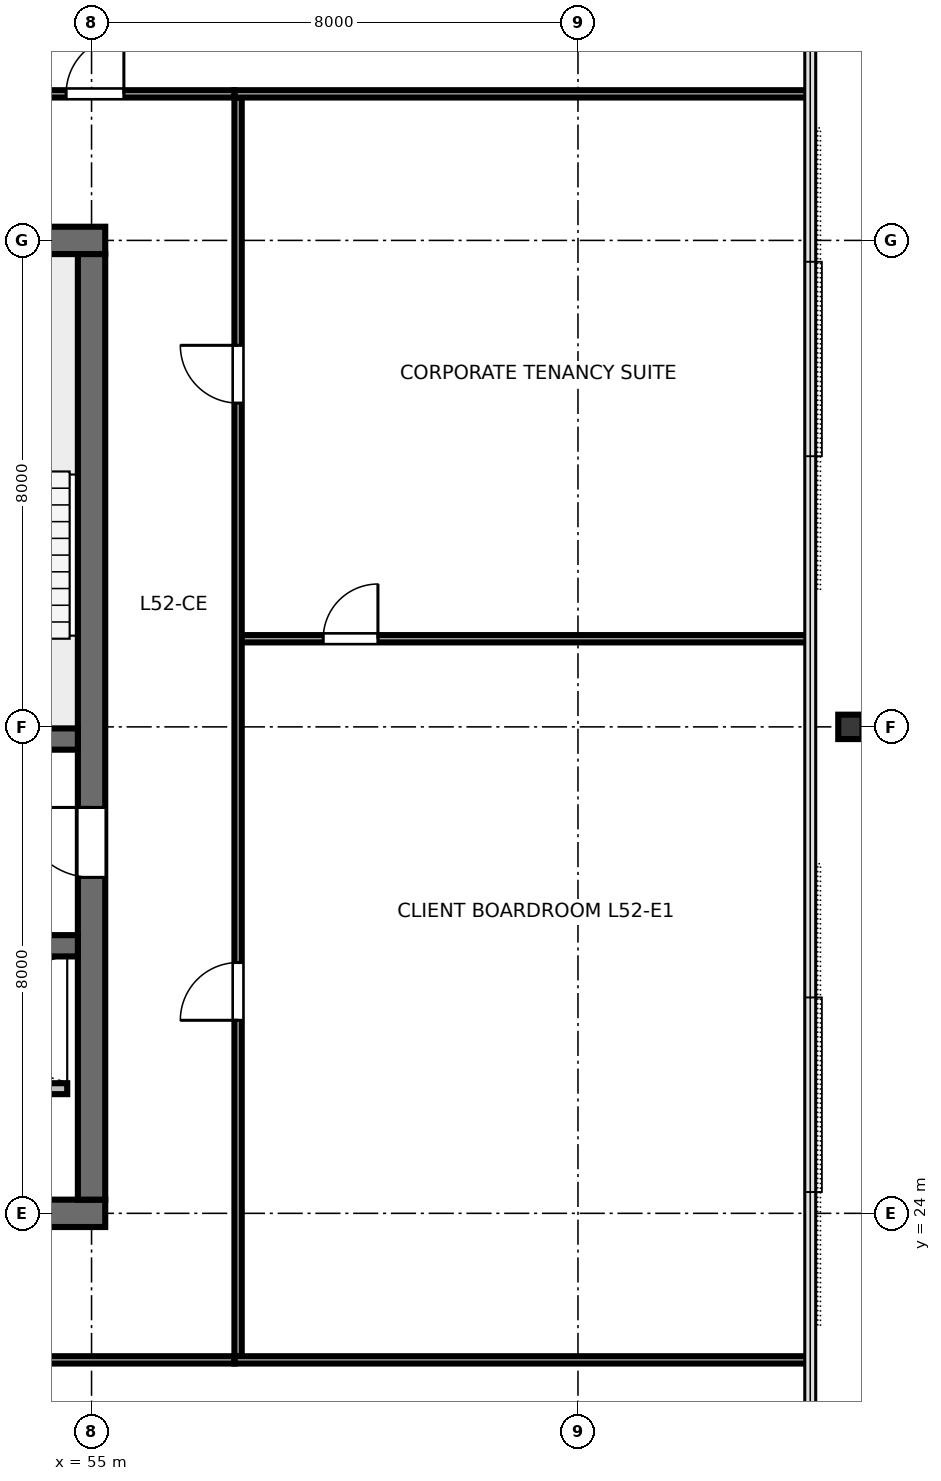
"""IFC4 building model, lengths in metres.
Left out: names, types, materials, properties, quantities, classifications, styles, units other than length and angle.
Written with IfcOpenShell. Run it as: python <this file> out.ifc"""

import sys

from ifc_helpers import new_model, si_unit, direction, frame, frame_2d, origin, origin_2d, place, context, subcontext, project, spatial, rectangle, i_section, extrude, element, fill, save


model = new_model("IFC4")
c1 = context("Model", 3, precision=1e-05, world=origin(), true_north=direction((0.0, 1.0)))
c2 = subcontext(c1, "Body", "Model", "MODEL_VIEW")
j1 = project(units=[si_unit("LENGTHUNIT", "METRE"), si_unit("PLANEANGLEUNIT", "RADIAN")], contexts=[c1])
p1 = place(None, origin())
s1 = spatial("IfcSite", under=j1, at=p1, CompositionType="ELEMENT")
p2 = place(p1, origin())
s2 = spatial("IfcBuilding", under=s1, at=p2, CompositionType="ELEMENT")
p3 = place(p2, frame((0.0, 0.0, 198.6)))
s3 = spatial("IfcBuildingStorey", under=s2, at=p3, CompositionType="ELEMENT", Elevation=198.6)
p4 = place(p3, frame((36.775, 24.0, 0.0), z_axis=(0.0, 0.0, 1.0), x_axis=(1.0, 0.0, 0.0)))
e1 = element("IfcWall", 1, at=p4, inside=s3, PredefinedType="SHEAR", context=c2, shape_type="SweptSolid", body=[
    extrude(rectangle(XDim=18.45, YDim=0.45, at=frame_2d((9.225, 0.0))), origin(), (0.0, 0.0, 1.0), 3.36),
])
p5 = place(p4, frame((13.425, 0.0, 0.0)))
e2 = element("IfcOpeningElement", 2, at=p5, cuts=e1, PredefinedType="OPENING", context=c2, shape_type="SweptSolid", body=[
    extrude(rectangle(XDim=1.6, YDim=2.15, at=frame_2d((0.8, 1.075))), frame((0.0, 0.235, 0.0), z_axis=(0.0, -1.0, 0.0), x_axis=(1.0, 0.0, 0.0)), (0.0, 0.0, 1.0), 0.47),
])
p6 = place(p3, frame((36.775, 40.0, 0.0), z_axis=(0.0, 0.0, 1.0), x_axis=(1.0, 0.0, 0.0)))
e3 = element("IfcWall", 3, at=p6, inside=s3, PredefinedType="SHEAR", context=c2, shape_type="SweptSolid", body=[
    extrude(rectangle(XDim=18.45, YDim=0.45, at=frame_2d((9.225, 0.0))), origin(), (0.0, 0.0, 1.0), 3.36),
])
p7 = place(p6, frame((10.525, 0.0, 0.0)))
e4 = element("IfcOpeningElement", 4, at=p7, cuts=e3, PredefinedType="OPENING", context=c2, shape_type="SweptSolid", body=[
    extrude(rectangle(XDim=1.0, YDim=2.15, at=frame_2d((0.5, 1.075))), frame((0.0, 0.235, 0.0), z_axis=(0.0, -1.0, 0.0), x_axis=(1.0, 0.0, 0.0)), (0.0, 0.0, 1.0), 0.47),
])
p8 = place(p3, frame((55.0, 24.225, 0.0), z_axis=(0.0, 0.0, 1.0), x_axis=(0.0, 1.0, 0.0)))
e5 = element("IfcWall", 5, at=p8, inside=s3, PredefinedType="SHEAR", context=c2, shape_type="SweptSolid", body=[
    extrude(rectangle(XDim=15.55, YDim=0.45, at=frame_2d((7.775, 0.0))), origin(), (0.0, 0.0, 1.0), 3.36),
])
p9 = place(p8, frame((5.3, 0.0, 0.0)))
e6 = element("IfcOpeningElement", 6, at=p9, cuts=e5, PredefinedType="OPENING", context=c2, shape_type="SweptSolid", body=[
    extrude(rectangle(XDim=1.15, YDim=2.15, at=frame_2d((0.575, 1.075))), frame((0.0, 0.235, 0.0), z_axis=(0.0, -1.0, 0.0), x_axis=(1.0, 0.0, 0.0)), (0.0, 0.0, 1.0), 0.47),
])
p10 = place(p3, frame((37.225, 31.8, 0.0), z_axis=(0.0, 0.0, 1.0), x_axis=(1.0, 0.0, 0.0)))
e7 = element("IfcWall", 7, at=p10, inside=s3, PredefinedType="SHEAR", context=c2, shape_type="SweptSolid", body=[
    extrude(rectangle(XDim=17.55, YDim=0.35, at=frame_2d((8.775, 0.0))), origin(), (0.0, 0.0, 1.0), 3.36),
])
p11 = place(p10, frame((0.825, 0.0, 0.0)))
e8 = element("IfcOpeningElement", 8, at=p11, cuts=e7, PredefinedType="OPENING", context=c2, shape_type="SweptSolid", body=[
    extrude(rectangle(XDim=1.1, YDim=2.15, at=frame_2d((0.55, 1.075))), frame((0.0, 0.185, 0.0), z_axis=(0.0, -1.0, 0.0), x_axis=(1.0, 0.0, 0.0)), (0.0, 0.0, 1.0), 0.37),
])
p12 = place(p10, frame((14.725, 0.0, 0.0)))
e9 = element("IfcOpeningElement", 9, at=p12, cuts=e7, PredefinedType="OPENING", context=c2, shape_type="SweptSolid", body=[
    extrude(rectangle(XDim=1.1, YDim=2.15, at=frame_2d((0.55, 1.075))), frame((0.0, 0.185, 0.0), z_axis=(0.0, -1.0, 0.0), x_axis=(1.0, 0.0, 0.0)), (0.0, 0.0, 1.0), 0.37),
])
p13 = place(p3, frame((37.225, 28.4, 0.0), z_axis=(0.0, 0.0, 1.0), x_axis=(1.0, 0.0, 0.0)))
e10 = element("IfcWall", 10, at=p13, inside=s3, PredefinedType="SHEAR", context=c2, shape_type="SweptSolid", body=[
    extrude(rectangle(XDim=17.55, YDim=0.35, at=frame_2d((8.775, 0.0))), origin(), (0.0, 0.0, 1.0), 3.36),
])
p14 = place(p3, frame((67.48, 32.0, 0.0), z_axis=(0.0, 0.0, 1.0), x_axis=(0.0, 1.0, 0.0)))
e11 = element("IfcColumn", 11, at=p14, inside=s3, PredefinedType="COLUMN", context=c2, shape_type="SweptSolid", body=[
    extrude(i_section(OverallWidth=0.401, OverallDepth=0.399, WebThickness=0.025, FlangeThickness=0.04, FilletRadius=0.025, at=origin_2d()), origin(), (0.0, 0.0, 1.0), 3.373),
])
p15 = place(p3, frame((47.6, 26.05, 0.0), z_axis=(0.0, 0.0, 1.0), x_axis=(1.0, 0.0, 0.0)))
e12 = element("IfcWall", 12, at=p15, inside=s3, PredefinedType="PARTITIONING", context=c2, shape_type="SweptSolid", body=[
    extrude(rectangle(XDim=7.0, YDim=0.18, at=frame_2d((3.5, 0.0))), origin(), (0.0, 0.0, 1.0), 3.375),
])
p16 = place(p15, frame((1.2, 0.0, 0.0)))
e13 = element("IfcOpeningElement", 13, at=p16, cuts=e12, PredefinedType="OPENING", context=c2, shape_type="SweptSolid", body=[
    extrude(rectangle(XDim=1.05, YDim=2.15, at=frame_2d((0.525, 1.075))), frame((0.0, 0.1, 0.0), z_axis=(0.0, -1.0, 0.0), x_axis=(1.0, 0.0, 0.0)), (0.0, 0.0, 1.0), 0.2),
])
p17 = place(p15, frame((3.4, 0.0, 0.0)))
e14 = element("IfcOpeningElement", 14, at=p17, cuts=e12, PredefinedType="OPENING", context=c2, shape_type="SweptSolid", body=[
    extrude(rectangle(XDim=1.05, YDim=2.15, at=frame_2d((0.525, 1.075))), frame((0.0, 0.1, 0.0), z_axis=(0.0, -1.0, 0.0), x_axis=(1.0, 0.0, 0.0)), (0.0, 0.0, 1.0), 0.2),
])
p18 = place(p3, frame((47.02, 21.59, 0.0), z_axis=(0.0, 0.0, 1.0), x_axis=(1.0, 0.0, 0.0)))
e15 = element("IfcWall", 15, at=p18, inside=s3, PredefinedType="PARTITIONING", context=c2, shape_type="SweptSolid", body=[
    extrude(rectangle(XDim=10.33, YDim=0.12, at=frame_2d((5.165, 0.0))), origin(), (0.0, 0.0, 1.0), 2.655),
])
p19 = place(p18, frame((5.59, 0.0, 0.0)))
e16 = element("IfcOpeningElement", 16, at=p19, cuts=e15, PredefinedType="OPENING", context=c2, shape_type="SweptSolid", body=[
    extrude(rectangle(XDim=0.95, YDim=2.15, at=frame_2d((0.475, 1.075))), frame((0.0, 0.07, 0.0), z_axis=(0.0, -1.0, 0.0), x_axis=(1.0, 0.0, 0.0)), (0.0, 0.0, 1.0), 0.14),
])
p20 = place(p3, frame((47.02, 42.41, 0.0), z_axis=(0.0, 0.0, 1.0), x_axis=(1.0, 0.0, 0.0)))
e17 = element("IfcWall", 17, at=p20, inside=s3, PredefinedType="PARTITIONING", context=c2, shape_type="SweptSolid", body=[
    extrude(rectangle(XDim=10.33, YDim=0.12, at=frame_2d((5.165, 0.0))), origin(), (0.0, 0.0, 1.0), 2.655),
])
p21 = place(p20, frame((2.467, 0.0, 0.0)))
e18 = element("IfcOpeningElement", 18, at=p21, cuts=e17, PredefinedType="OPENING", context=c2, shape_type="SweptSolid", body=[
    extrude(rectangle(XDim=0.95, YDim=2.15, at=frame_2d((0.475, 1.075))), frame((0.0, 0.07, 0.0), z_axis=(0.0, -1.0, 0.0), x_axis=(1.0, 0.0, 0.0)), (0.0, 0.0, 1.0), 0.14),
])
p22 = place(p20, frame((7.562, 0.0, 0.0)))
e19 = element("IfcOpeningElement", 19, at=p22, cuts=e17, PredefinedType="OPENING", context=c2, shape_type="SweptSolid", body=[
    extrude(rectangle(XDim=0.95, YDim=2.15, at=frame_2d((0.475, 1.075))), frame((0.0, 0.07, 0.0), z_axis=(0.0, -1.0, 0.0), x_axis=(1.0, 0.0, 0.0)), (0.0, 0.0, 1.0), 0.14),
])
p23 = place(p3, frame((57.41, 33.449, 0.0), z_axis=(0.0, 0.0, 1.0), x_axis=(1.0, 0.0, 0.0)))
e20 = element("IfcWall", 20, at=p23, inside=s3, PredefinedType="PARTITIONING", context=c2, shape_type="SweptSolid", body=[
    extrude(rectangle(XDim=9.41, YDim=0.12, at=frame_2d((4.705, 0.0))), origin(), (0.0, 0.0, 1.0), 2.655),
])
p24 = place(p23, frame((1.4, 0.0, 0.0)))
e21 = element("IfcOpeningElement", 21, at=p24, cuts=e20, PredefinedType="OPENING", context=c2, shape_type="SweptSolid", body=[
    extrude(rectangle(XDim=0.9, YDim=2.15, at=frame_2d((0.45, 1.075))), frame((0.0, 0.07, 0.0), z_axis=(0.0, -1.0, 0.0), x_axis=(1.0, 0.0, 0.0)), (0.0, 0.0, 1.0), 0.14),
])
p25 = place(p3, frame((57.41, 21.65, 0.0), z_axis=(0.0, 0.0, 1.0), x_axis=(0.0, 1.0, 0.0)))
e22 = element("IfcWall", 22, at=p25, inside=s3, PredefinedType="PARTITIONING", context=c2, shape_type="SweptSolid", body=[
    extrude(rectangle(XDim=20.7, YDim=0.12, at=frame_2d((10.35, 0.0))), origin(), (0.0, 0.0, 1.0), 2.655),
])
p26 = place(p25, frame((5.525, 0.0, 0.0)))
e23 = element("IfcOpeningElement", 23, at=p26, cuts=e22, PredefinedType="OPENING", context=c2, shape_type="SweptSolid", body=[
    extrude(rectangle(XDim=0.95, YDim=2.15, at=frame_2d((0.475, 1.075))), frame((0.0, 0.07, 0.0), z_axis=(0.0, -1.0, 0.0), x_axis=(1.0, 0.0, 0.0)), (0.0, 0.0, 1.0), 0.14),
])
p27 = place(p25, frame((15.675, 0.0, 0.0)))
e24 = element("IfcOpeningElement", 24, at=p27, cuts=e22, PredefinedType="OPENING", context=c2, shape_type="SweptSolid", body=[
    extrude(rectangle(XDim=0.95, YDim=2.15, at=frame_2d((0.475, 1.075))), frame((0.0, 0.07, 0.0), z_axis=(0.0, -1.0, 0.0), x_axis=(1.0, 0.0, 0.0)), (0.0, 0.0, 1.0), 0.14),
])
for number, where, z_axis, x_axis in (
    (25, (57.35, 21.59, 0.0), (0.0, 0.0, 1.0), (1.0, 0.0, 0.0)),
    (26, (57.35, 42.41, 0.0), (0.0, 0.0, 1.0), (1.0, 0.0, 0.0)),
):
    element("IfcWall", number, at=place(p3, frame(where, z_axis=z_axis, x_axis=x_axis)), inside=s3, PredefinedType="PARTITIONING", context=c2, shape_type="SweptSolid", body=[
        extrude(rectangle(XDim=9.47, YDim=0.12, at=frame_2d((4.735, 0.0))), origin(), (0.0, 0.0, 1.0), 2.655),
    ])
p28 = place(p9, origin())
e27 = element("IfcDoor", 27, at=p28, inside=s3, OperationType="SINGLE_SWING_RIGHT", PredefinedType="DOOR", context=c2, shape_type="SweptSolid", body=[
    extrude(rectangle(XDim=1.15, YDim=2.15, at=frame_2d((0.575, 1.075))), frame((0.0, 0.025, 0.0), z_axis=(0.0, -1.0, 0.0), x_axis=(1.0, 0.0, 0.0)), (0.0, 0.0, 1.0), 0.05),
])
fill(e6, e27)
p29 = place(p22, origin())
e28 = element("IfcDoor", 28, at=p29, inside=s3, OperationType="SINGLE_SWING_RIGHT", PredefinedType="DOOR", context=c2, shape_type="SweptSolid", body=[
    extrude(rectangle(XDim=0.95, YDim=2.15, at=frame_2d((0.475, 1.075))), frame((0.0, 0.025, 0.0), z_axis=(0.0, -1.0, 0.0), x_axis=(1.0, 0.0, 0.0)), (0.0, 0.0, 1.0), 0.05),
])
fill(e19, e28)
p30 = place(p24, origin())
e29 = element("IfcDoor", 29, at=p30, inside=s3, OperationType="SINGLE_SWING_RIGHT", PredefinedType="DOOR", context=c2, shape_type="SweptSolid", body=[
    extrude(rectangle(XDim=0.9, YDim=2.15, at=frame_2d((0.45, 1.075))), frame((0.0, 0.025, 0.0), z_axis=(0.0, -1.0, 0.0), x_axis=(1.0, 0.0, 0.0)), (0.0, 0.0, 1.0), 0.05),
])
fill(e21, e29)
p31 = place(p26, origin())
e30 = element("IfcDoor", 30, at=p31, inside=s3, OperationType="SINGLE_SWING_LEFT", PredefinedType="DOOR", context=c2, shape_type="SweptSolid", body=[
    extrude(rectangle(XDim=0.95, YDim=2.15, at=frame_2d((0.475, 1.075))), frame((0.0, 0.025, 0.0), z_axis=(0.0, -1.0, 0.0), x_axis=(1.0, 0.0, 0.0)), (0.0, 0.0, 1.0), 0.05),
])
fill(e23, e30)
p32 = place(p27, origin())
e31 = element("IfcDoor", 31, at=p32, inside=s3, OperationType="SINGLE_SWING_RIGHT", PredefinedType="DOOR", context=c2, shape_type="SweptSolid", body=[
    extrude(rectangle(XDim=0.95, YDim=2.15, at=frame_2d((0.475, 1.075))), frame((0.0, 0.025, 0.0), z_axis=(0.0, -1.0, 0.0), x_axis=(1.0, 0.0, 0.0)), (0.0, 0.0, 1.0), 0.05),
])
fill(e24, e31)
save(model, sys.argv[1])
